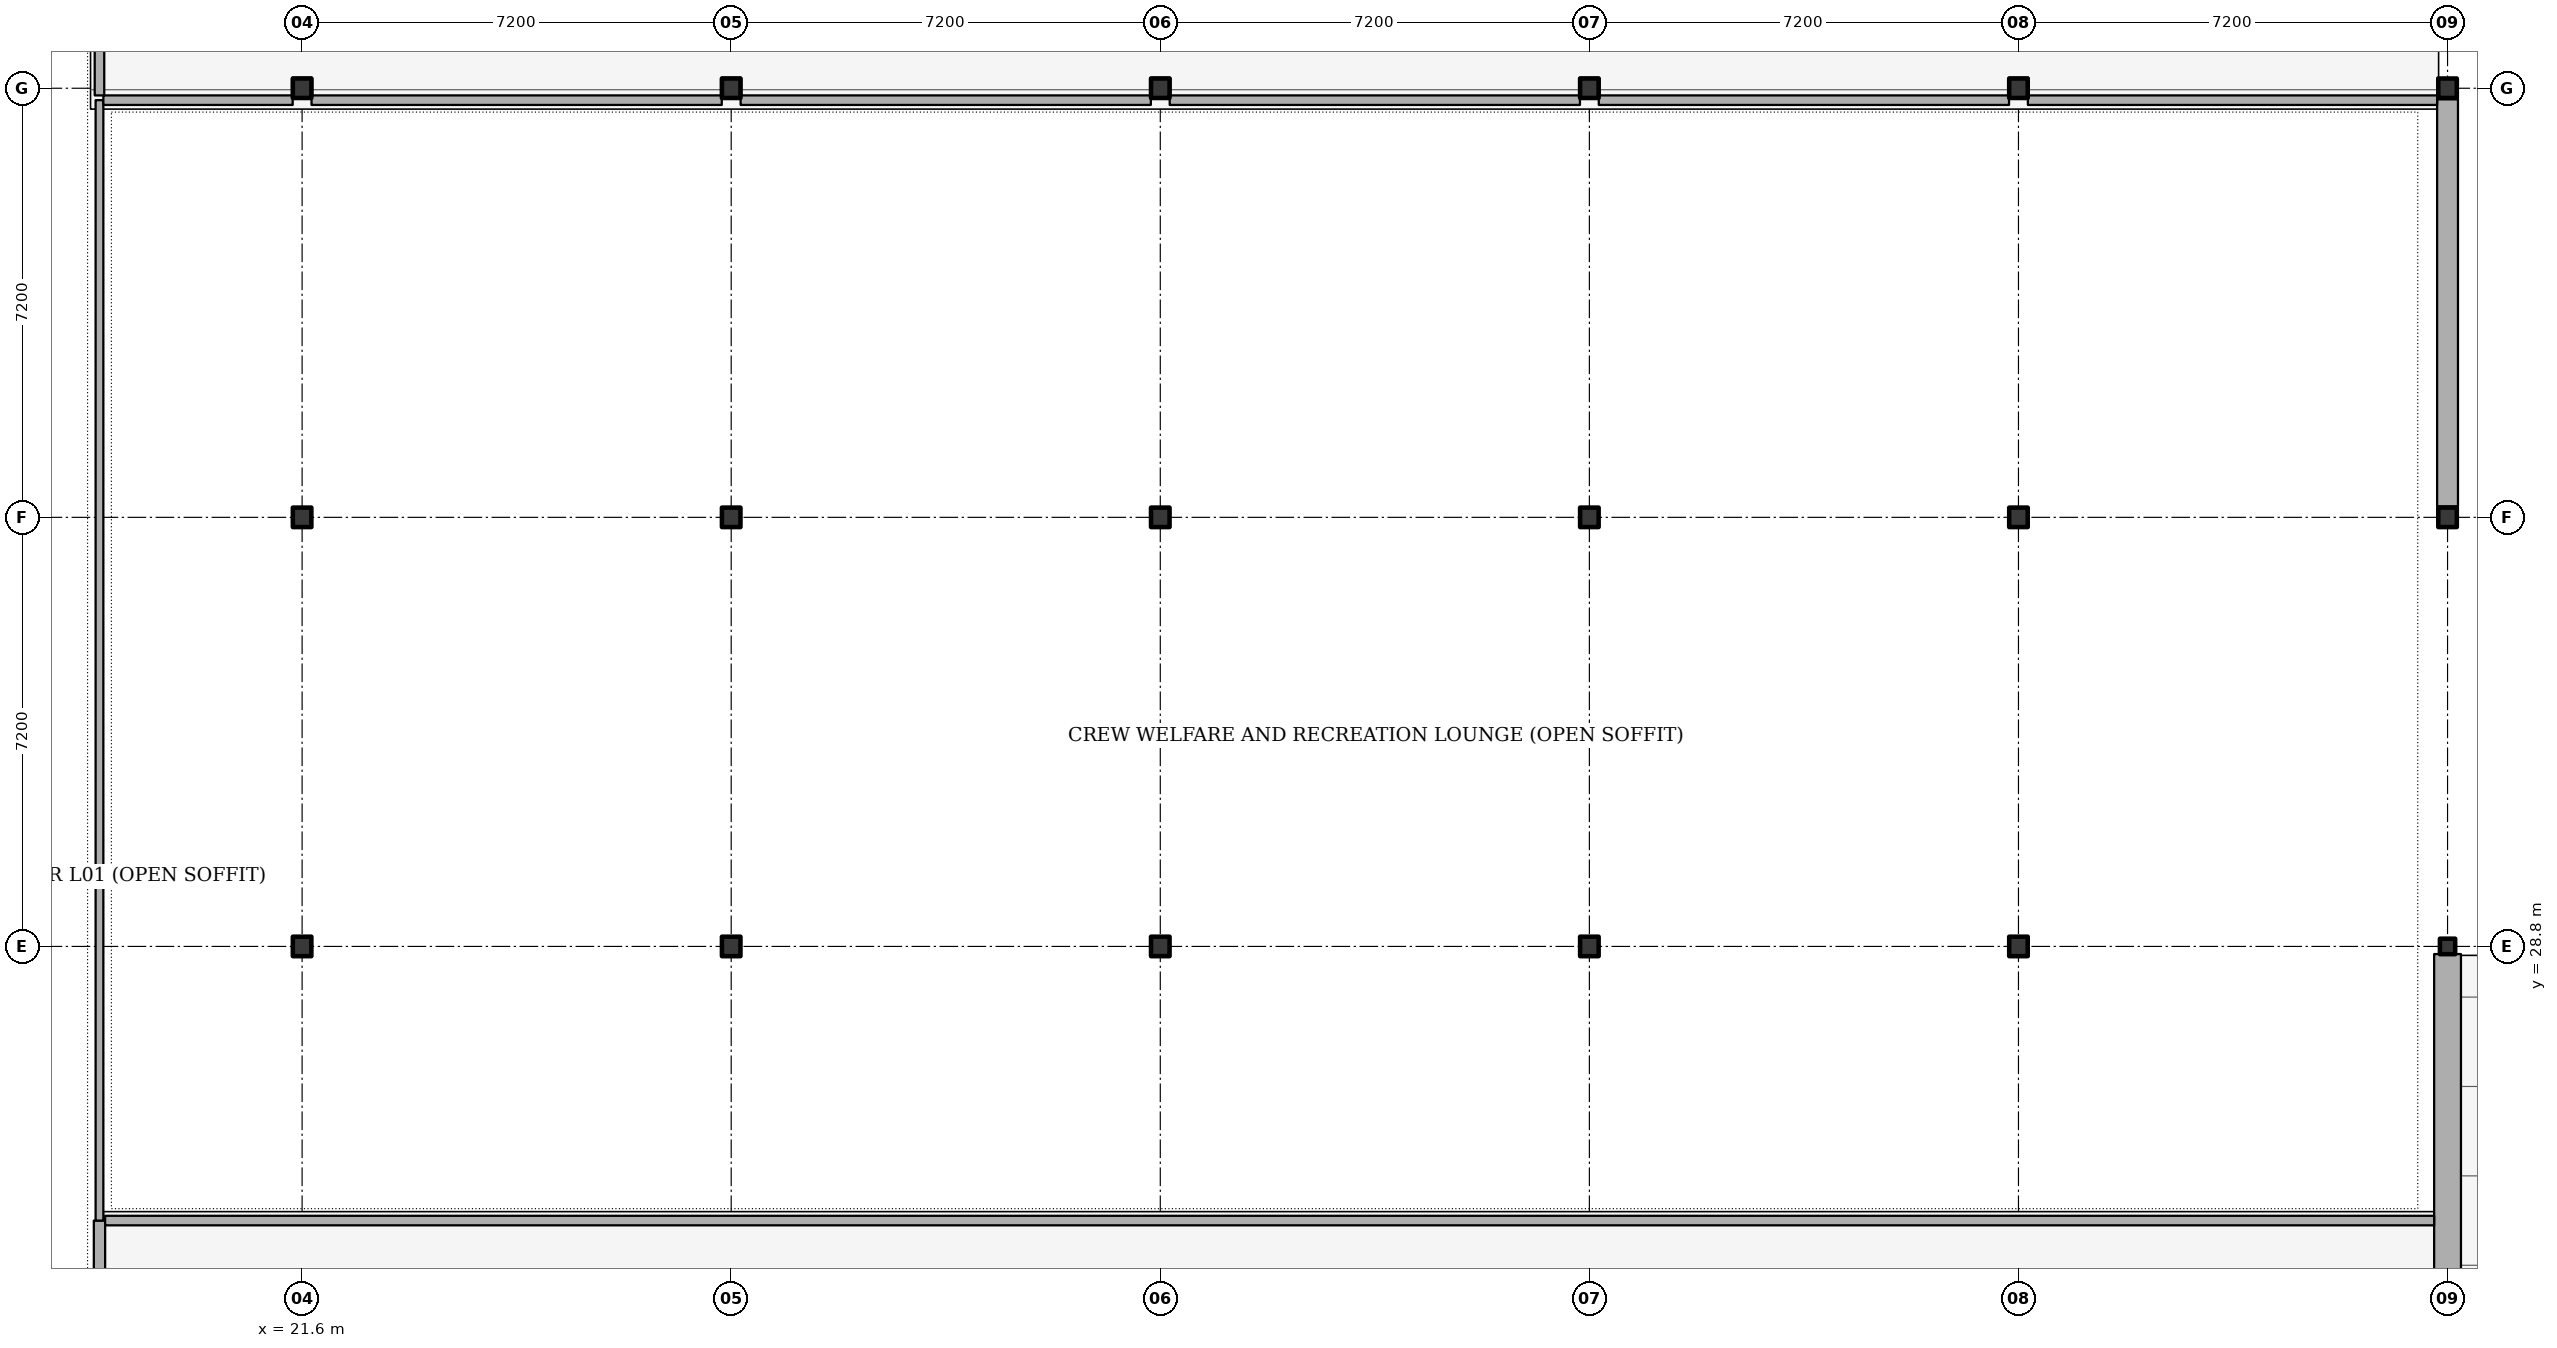
"""IFC4 building model, lengths in metres.
Left out: names, types, materials, properties, quantities, classifications, styles, units other than length and angle.
Written with IfcOpenShell. Run it as: python <this file> out.ifc"""

import sys

from ifc_helpers import new_model, si_unit, direction, frame, frame_2d, origin, origin_2d, place, context, subcontext, project, spatial, rectangle, i_section, extrude, element, fill, save


model = new_model("IFC4")
c1 = context("Model", 3, precision=1e-05, world=origin(), true_north=direction((0.0, 1.0)))
c2 = subcontext(c1, "Body", "Model", "MODEL_VIEW")
j1 = project(units=[si_unit("LENGTHUNIT", "METRE"), si_unit("PLANEANGLEUNIT", "RADIAN")], contexts=[c1])
p1 = place(None, origin())
s1 = spatial("IfcSite", under=j1, at=p1, CompositionType="ELEMENT")
p2 = place(p1, origin())
s2 = spatial("IfcBuilding", under=s1, at=p2, CompositionType="ELEMENT")
p3 = place(p2, frame((0.0, 0.0, 5.4)))
s3 = spatial("IfcBuildingStorey", under=s2, at=p3, CompositionType="ELEMENT", Elevation=5.4)
for number, where, z_axis, x_axis in (
    (1, (21.6, 28.8, 0.0), (0.0, 0.0, 1.0), (1.0, 0.0, 0.0)),
    (2, (21.6, 36.0, 0.0), (0.0, 0.0, 1.0), (1.0, 0.0, 0.0)),
    (3, (21.6, 43.2, 0.0), (0.0, 0.0, 1.0), (1.0, 0.0, 0.0)),
    (4, (28.8, 28.8, 0.0), (0.0, 0.0, 1.0), (1.0, 0.0, 0.0)),
    (5, (28.8, 36.0, 0.0), (0.0, 0.0, 1.0), (1.0, 0.0, 0.0)),
    (6, (28.8, 43.2, 0.0), (0.0, 0.0, 1.0), (1.0, 0.0, 0.0)),
    (7, (36.0, 28.8, 0.0), (0.0, 0.0, 1.0), (1.0, 0.0, 0.0)),
    (8, (36.0, 36.0, 0.0), (0.0, 0.0, 1.0), (1.0, 0.0, 0.0)),
    (9, (36.0, 43.2, 0.0), (0.0, 0.0, 1.0), (1.0, 0.0, 0.0)),
    (10, (43.2, 28.8, 0.0), (0.0, 0.0, 1.0), (1.0, 0.0, 0.0)),
    (11, (43.2, 36.0, 0.0), (0.0, 0.0, 1.0), (1.0, 0.0, 0.0)),
    (12, (43.2, 43.2, 0.0), (0.0, 0.0, 1.0), (1.0, 0.0, 0.0)),
    (13, (50.4, 28.8, 0.0), (0.0, 0.0, 1.0), (1.0, 0.0, 0.0)),
    (14, (50.4, 36.0, 0.0), (0.0, 0.0, 1.0), (1.0, 0.0, 0.0)),
    (15, (50.4, 43.2, 0.0), (0.0, 0.0, 1.0), (1.0, 0.0, 0.0)),
):
    element("IfcColumn", number, at=place(p3, frame(where, z_axis=z_axis, x_axis=x_axis)), inside=s3, PredefinedType="COLUMN", context=c2, shape_type="SweptSolid", body=[
        extrude(i_section(OverallWidth=0.311, OverallDepth=0.327, WebThickness=0.016, FlangeThickness=0.025, FilletRadius=0.015, at=origin_2d()), origin(), (0.0, 0.0, 1.0), 4.5),
    ])
p4 = place(p3, frame((57.6, 28.8, 0.0), z_axis=(0.0, 0.0, 1.0), x_axis=(1.0, 0.0, 0.0)))
e16 = element("IfcColumn", 16, at=p4, inside=s3, PredefinedType="COLUMN", context=c2, shape_type="SweptSolid", body=[
    extrude(i_section(OverallWidth=0.256, OverallDepth=0.26, WebThickness=0.01, FlangeThickness=0.017, FilletRadius=0.013, at=origin_2d()), origin(), (0.0, 0.0, 1.0), 4.5),
])
for number, where, z_axis, x_axis in (
    (17, (57.6, 36.0, 0.0), (0.0, 0.0, 1.0), (1.0, 0.0, 0.0)),
    (18, (57.6, 43.2, 0.0), (0.0, 0.0, 1.0), (1.0, 0.0, 0.0)),
):
    element("IfcColumn", number, at=place(p3, frame(where, z_axis=z_axis, x_axis=x_axis)), inside=s3, PredefinedType="COLUMN", context=c2, shape_type="SweptSolid", body=[
        extrude(i_section(OverallWidth=0.311, OverallDepth=0.327, WebThickness=0.016, FlangeThickness=0.025, FilletRadius=0.015, at=origin_2d()), origin(), (0.0, 0.0, 1.0), 4.5),
    ])
p5 = place(p3, frame((57.6, 21.6, 0.0), z_axis=(0.0, 0.0, 1.0), x_axis=(0.0, 1.0, 0.0)))
e19 = element("IfcWall", 19, at=p5, inside=s3, PredefinedType="SOLIDWALL", context=c2, shape_type="SweptSolid", body=[
    extrude(rectangle(XDim=7.072, YDim=0.45, at=frame_2d((3.536, 0.0))), origin(), (0.0, 0.0, 1.0), 3.694),
])
p6 = place(p3, frame((57.6, 43.017, 0.0), z_axis=(0.0, 0.0, 1.0), x_axis=(0.0, -1.0, 0.0)))
e20 = element("IfcWall", 20, at=p6, inside=s3, PredefinedType="SOLIDWALL", context=c2, shape_type="SweptSolid", body=[
    extrude(rectangle(XDim=6.833, YDim=0.35, at=frame_2d((3.417, 0.0))), origin(), (0.0, 0.0, 1.0), 3.704),
])
p7 = place(p6, frame((2.091, 0.0, 1.05)))
e21 = element("IfcOpeningElement", 21, at=p7, cuts=e20, PredefinedType="OPENING", context=c2, shape_type="SweptSolid", body=[
    extrude(rectangle(XDim=2.65, YDim=1.6, at=frame_2d((1.325, 0.8))), frame((0.0, 0.185, 0.0), z_axis=(0.0, -1.0, 0.0), x_axis=(1.0, 0.0, 0.0)), (0.0, 0.0, 1.0), 0.37),
])
p8 = place(p3, frame((18.2, 0.175, 0.0), z_axis=(0.0, 0.0, 1.0), x_axis=(0.0, 1.0, 0.0)))
e22 = element("IfcWall", 22, at=p8, inside=s3, PredefinedType="PARTITIONING", context=c2, shape_type="SweptSolid", body=[
    extrude(rectangle(XDim=24.025, YDim=0.19, at=frame_2d((12.012, 0.0))), origin(), (0.0, 0.0, 1.0), 3.55),
])
p9 = place(p8, frame((16.425, 0.0, 0.0)))
e23 = element("IfcOpeningElement", 23, at=p9, cuts=e22, PredefinedType="OPENING", context=c2, shape_type="SweptSolid", body=[
    extrude(rectangle(XDim=1.6, YDim=2.2, at=frame_2d((0.8, 1.1))), frame((0.0, 0.105, 0.0), z_axis=(0.0, -1.0, 0.0), x_axis=(1.0, 0.0, 0.0)), (0.0, 0.0, 1.0), 0.21),
])
p10 = place(p3, frame((18.2, 24.2, 0.0), z_axis=(0.0, 0.0, 1.0), x_axis=(0.0, 1.0, 0.0)))
e24 = element("IfcWall", 24, at=p10, inside=s3, PredefinedType="PARTITIONING", context=c2, shape_type="SweptSolid", body=[
    extrude(rectangle(XDim=18.8, YDim=0.13, at=frame_2d((9.4, 0.0))), origin(), (0.0, 0.0, 1.0), 3.55),
])
p11 = place(p10, frame((0.32, 0.0, 0.0)))
e25 = element("IfcOpeningElement", 25, at=p11, cuts=e24, PredefinedType="OPENING", context=c2, shape_type="SweptSolid", body=[
    extrude(rectangle(XDim=0.95, YDim=2.1, at=frame_2d((0.475, 1.05))), frame((0.0, 0.075, 0.0), z_axis=(0.0, -1.0, 0.0), x_axis=(1.0, 0.0, 0.0)), (0.0, 0.0, 1.0), 0.15),
])
p12 = place(p3, frame((18.295, 24.2, 0.0), z_axis=(0.0, 0.0, 1.0), x_axis=(1.0, 0.0, 0.0)))
e26 = element("IfcWall", 26, at=p12, inside=s3, PredefinedType="PARTITIONING", context=c2, shape_type="SweptSolid", body=[
    extrude(rectangle(XDim=39.08, YDim=0.16, at=frame_2d((19.54, 0.0))), origin(), (0.0, 0.0, 1.0), 3.55),
])
p13 = place(p3, frame((18.265, 43.0, 0.0), z_axis=(0.0, 0.0, 1.0), x_axis=(1.0, 0.0, 0.0)))
e27 = element("IfcWall", 27, at=p13, inside=s3, PredefinedType="PARTITIONING", context=c2, shape_type="SweptSolid", body=[
    extrude(rectangle(XDim=3.177, YDim=0.16, at=frame_2d((1.588, 0.0))), origin(), (0.0, 0.0, 1.0), 3.55),
])
for number, where, z_axis, x_axis in (
    (28, (21.758, 43.0, 0.0), (0.0, 0.0, 1.0), (1.0, 0.0, 0.0)),
    (29, (28.958, 43.0, 0.0), (0.0, 0.0, 1.0), (1.0, 0.0, 0.0)),
    (30, (36.158, 43.0, 0.0), (0.0, 0.0, 1.0), (1.0, 0.0, 0.0)),
    (31, (43.358, 43.0, 0.0), (0.0, 0.0, 1.0), (1.0, 0.0, 0.0)),
):
    element("IfcWall", number, at=place(p3, frame(where, z_axis=z_axis, x_axis=x_axis)), inside=s3, PredefinedType="PARTITIONING", context=c2, shape_type="SweptSolid", body=[
        extrude(rectangle(XDim=6.884, YDim=0.16, at=frame_2d((3.442, 0.0))), origin(), (0.0, 0.0, 1.0), 3.55),
    ])
p14 = place(p3, frame((50.558, 43.0, 0.0), z_axis=(0.0, 0.0, 1.0), x_axis=(1.0, 0.0, 0.0)))
e32 = element("IfcWall", 32, at=p14, inside=s3, PredefinedType="PARTITIONING", context=c2, shape_type="SweptSolid", body=[
    extrude(rectangle(XDim=6.867, YDim=0.16, at=frame_2d((3.434, 0.0))), origin(), (0.0, 0.0, 1.0), 3.55),
])
p15 = place(p3, frame((18.2, 43.08, 0.0), z_axis=(0.0, 0.0, 1.0), x_axis=(0.0, 1.0, 0.0)))
e33 = element("IfcWall", 33, at=p15, inside=s3, PredefinedType="PARTITIONING", context=c2, shape_type="SweptSolid", body=[
    extrude(rectangle(XDim=11.263, YDim=0.16, at=frame_2d((5.631, 0.0))), origin(), (0.0, 0.0, 1.0), 3.55),
])
p16 = place(p7, origin())
e34 = element("IfcWindow", 34, at=p16, inside=s3, PartitioningType="SINGLE_PANEL", PredefinedType="WINDOW", context=c2, shape_type="SweptSolid", body=[
    extrude(rectangle(XDim=2.65, YDim=1.6, at=frame_2d((1.325, 0.8))), frame((0.0, 0.03, 0.0), z_axis=(0.0, -1.0, 0.0), x_axis=(1.0, 0.0, 0.0)), (0.0, 0.0, 1.0), 0.06),
])
fill(e21, e34)
p17 = place(p11, origin())
e35 = element("IfcDoor", 35, at=p17, inside=s3, OperationType="SINGLE_SWING_LEFT", PredefinedType="DOOR", context=c2, shape_type="SweptSolid", body=[
    extrude(rectangle(XDim=0.95, YDim=2.1, at=frame_2d((0.475, 1.05))), frame((0.0, 0.025, 0.0), z_axis=(0.0, -1.0, 0.0), x_axis=(1.0, 0.0, 0.0)), (0.0, 0.0, 1.0), 0.05),
])
fill(e25, e35)
save(model, sys.argv[1])
